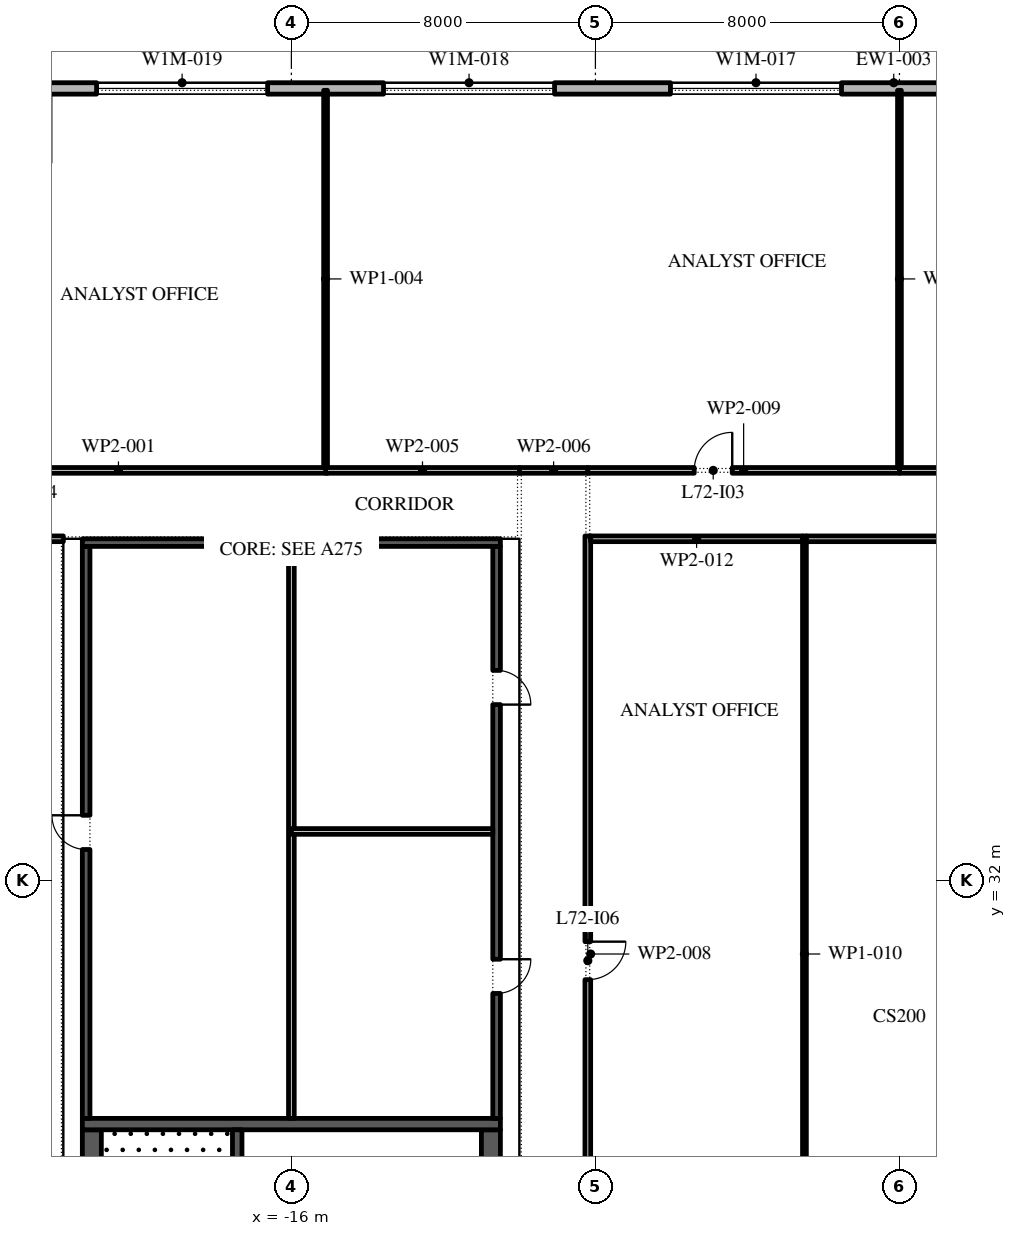
"""IFC4 building model, lengths in metres.
Left out: names, types, materials, properties, quantities, classifications, styles, units other than length and angle.
Written with IfcOpenShell. Run it as: python <this file> out.ifc"""

import sys

from ifc_helpers import new_model, si_unit, direction, frame, frame_2d, origin, place, context, subcontext, project, spatial, rectangle, extrude, element, fill, save


model = new_model("IFC4")
c1 = context("Model", 3, precision=1e-05, world=origin(), true_north=direction((0.0, 1.0)))
c2 = subcontext(c1, "Body", "Model", "MODEL_VIEW")
j1 = project(units=[si_unit("LENGTHUNIT", "METRE"), si_unit("PLANEANGLEUNIT", "RADIAN")], contexts=[c1])
p1 = place(None, origin())
s1 = spatial("IfcSite", under=j1, at=p1, CompositionType="ELEMENT")
p2 = place(p1, origin())
s2 = spatial("IfcBuilding", under=s1, at=p2, CompositionType="ELEMENT")
p3 = place(p2, frame((0.0, 0.0, 330.0)))
s3 = spatial("IfcBuildingStorey", under=s2, at=p3, CompositionType="ELEMENT", Elevation=330.0)
p4 = place(p3, frame((22.35, 52.85, 0.0), z_axis=(0.0, 0.0, 1.0), x_axis=(-1.0, 0.0, 0.0)))
e1 = element("IfcWall", 1, at=p4, inside=s3, PredefinedType="STANDARD", context=c2, shape_type="SweptSolid", body=[
    extrude(rectangle(XDim=45.0, YDim=0.3, at=frame_2d((22.5, 0.0))), origin(), (0.0, 0.0, 1.0), 4.0),
])
p5 = place(p4, frame((1.375, 0.0, 0.45)))
e2 = element("IfcOpeningElement", 2, at=p5, cuts=e1, PredefinedType="OPENING", context=c2, shape_type="SweptSolid", body=[
    extrude(rectangle(XDim=4.5, YDim=2.575, at=frame_2d((2.25, 1.288))), frame((0.0, 0.16, 0.0), z_axis=(0.0, -1.0, 0.0), x_axis=(1.0, 0.0, 0.0)), (0.0, 0.0, 1.0), 0.32),
])
p6 = place(p4, frame((8.775, 0.0, 0.45)))
e3 = element("IfcOpeningElement", 3, at=p6, cuts=e1, PredefinedType="OPENING", context=c2, shape_type="SweptSolid", body=[
    extrude(rectangle(XDim=4.5, YDim=2.575, at=frame_2d((2.25, 1.288))), frame((0.0, 0.16, 0.0), z_axis=(0.0, -1.0, 0.0), x_axis=(1.0, 0.0, 0.0)), (0.0, 0.0, 1.0), 0.32),
])
p7 = place(p4, frame((17.375, 0.0, 0.0)))
e4 = element("IfcOpeningElement", 4, at=p7, cuts=e1, PredefinedType="OPENING", context=c2, shape_type="SweptSolid", body=[
    extrude(rectangle(XDim=2.4, YDim=3.025, at=frame_2d((1.2, 1.512))), frame((0.0, 0.16, 0.0), z_axis=(0.0, -1.0, 0.0), x_axis=(1.0, 0.0, 0.0)), (0.0, 0.0, 1.0), 0.32),
])
p8 = place(p4, frame((23.875, 0.0, 0.45)))
e5 = element("IfcOpeningElement", 5, at=p8, cuts=e1, PredefinedType="OPENING", context=c2, shape_type="SweptSolid", body=[
    extrude(rectangle(XDim=4.5, YDim=2.575, at=frame_2d((2.25, 1.288))), frame((0.0, 0.16, 0.0), z_axis=(0.0, -1.0, 0.0), x_axis=(1.0, 0.0, 0.0)), (0.0, 0.0, 1.0), 0.32),
])
p9 = place(p4, frame((31.425, 0.0, 0.45)))
e6 = element("IfcOpeningElement", 6, at=p9, cuts=e1, PredefinedType="OPENING", context=c2, shape_type="SweptSolid", body=[
    extrude(rectangle(XDim=4.5, YDim=2.575, at=frame_2d((2.25, 1.288))), frame((0.0, 0.16, 0.0), z_axis=(0.0, -1.0, 0.0), x_axis=(1.0, 0.0, 0.0)), (0.0, 0.0, 1.0), 0.32),
])
p10 = place(p4, frame((38.975, 0.0, 0.45)))
e7 = element("IfcOpeningElement", 7, at=p10, cuts=e1, PredefinedType="OPENING", context=c2, shape_type="SweptSolid", body=[
    extrude(rectangle(XDim=4.5, YDim=2.575, at=frame_2d((2.25, 1.288))), frame((0.0, 0.16, 0.0), z_axis=(0.0, -1.0, 0.0), x_axis=(1.0, 0.0, 0.0)), (0.0, 0.0, 1.0), 0.32),
])
p11 = place(p3, frame((-21.25, -2.45, 0.0), z_axis=(0.0, 0.0, 1.0), x_axis=(0.0, 1.0, 0.0)))
e8 = element("IfcWall", 8, at=p11, inside=s3, PredefinedType="SHEAR", context=c2, shape_type="SweptSolid", body=[
    extrude(rectangle(XDim=27.9, YDim=0.5, at=frame_2d((13.95, 0.0))), origin(), (0.0, 0.0, 1.0), 4.0),
])
p12 = place(p11, frame((5.05, 0.0, 0.0)))
e9 = element("IfcOpeningElement", 9, at=p12, cuts=e8, PredefinedType="OPENING", context=c2, shape_type="SweptSolid", body=[
    extrude(rectangle(XDim=1.2, YDim=2.1, at=frame_2d((0.6, 1.05))), frame((0.0, 0.26, 0.0), z_axis=(0.0, -1.0, 0.0), x_axis=(1.0, 0.0, 0.0)), (0.0, 0.0, 1.0), 0.52),
])
p13 = place(p11, frame((21.65, 0.0, 0.0)))
e10 = element("IfcOpeningElement", 10, at=p13, cuts=e8, PredefinedType="OPENING", context=c2, shape_type="SweptSolid", body=[
    extrude(rectangle(XDim=1.2, YDim=2.1, at=frame_2d((0.6, 1.05))), frame((0.0, 0.26, 0.0), z_axis=(0.0, -1.0, 0.0), x_axis=(1.0, 0.0, 0.0)), (0.0, 0.0, 1.0), 0.52),
])
p14 = place(p3, frame((-10.75, -2.45, 0.0), z_axis=(0.0, 0.0, 1.0), x_axis=(0.0, 1.0, 0.0)))
e11 = element("IfcWall", 11, at=p14, inside=s3, PredefinedType="SHEAR", context=c2, shape_type="SweptSolid", body=[
    extrude(rectangle(XDim=27.9, YDim=0.5, at=frame_2d((13.95, 0.0))), origin(), (0.0, 0.0, 1.0), 4.0),
])
p15 = place(p14, frame((23.65, 0.0, 0.0)))
e12 = element("IfcOpeningElement", 12, at=p15, cuts=e11, PredefinedType="OPENING", context=c2, shape_type="SweptSolid", body=[
    extrude(rectangle(XDim=2.4, YDim=2.1, at=frame_2d((1.2, 1.05))), frame((0.0, 0.26, 0.0), z_axis=(0.0, -1.0, 0.0), x_axis=(1.0, 0.0, 0.0)), (0.0, 0.0, 1.0), 0.52),
])
p16 = place(p14, frame((1.087, 0.0, 0.0)))
e13 = element("IfcOpeningElement", 13, at=p16, cuts=e11, PredefinedType="OPENING", context=c2, shape_type="SweptSolid", body=[
    extrude(rectangle(XDim=0.9, YDim=2.1, at=frame_2d((0.45, 1.05))), frame((0.0, 0.26, 0.0), z_axis=(0.0, -1.0, 0.0), x_axis=(1.0, 0.0, 0.0)), (0.0, 0.0, 1.0), 0.52),
])
p17 = place(p14, frame((4.262, 0.0, 0.0)))
e14 = element("IfcOpeningElement", 14, at=p17, cuts=e11, PredefinedType="OPENING", context=c2, shape_type="SweptSolid", body=[
    extrude(rectangle(XDim=1.0, YDim=2.1, at=frame_2d((0.5, 1.05))), frame((0.0, 0.26, 0.0), z_axis=(0.0, -1.0, 0.0), x_axis=(1.0, 0.0, 0.0)), (0.0, 0.0, 1.0), 0.52),
])
p18 = place(p3, frame((-21.5, 25.6, 0.0), z_axis=(0.0, 0.0, 1.0), x_axis=(1.0, 0.0, 0.0)))
e15 = element("IfcWall", 15, at=p18, inside=s3, PredefinedType="SHEAR", context=c2, shape_type="SweptSolid", body=[
    extrude(rectangle(XDim=11.0, YDim=0.3, at=frame_2d((5.5, 0.0))), origin(), (0.0, 0.0, 1.0), 4.0),
])
p19 = place(p3, frame((-17.425, 19.15, 0.0), z_axis=(0.0, 0.0, 1.0), x_axis=(0.0, 1.0, 0.0)))
e16 = element("IfcWall", 16, at=p19, inside=s3, PredefinedType="SHEAR", context=c2, shape_type="SweptSolid", body=[
    extrude(rectangle(XDim=6.3, YDim=0.25, at=frame_2d((3.15, 0.0))), origin(), (0.0, 0.0, 1.0), 4.0),
])
p20 = place(p19, frame((0.05, 0.0, 0.0)))
e17 = element("IfcOpeningElement", 17, at=p20, cuts=e16, PredefinedType="OPENING", context=c2, shape_type="SweptSolid", body=[
    extrude(rectangle(XDim=1.2, YDim=2.1, at=frame_2d((0.6, 1.05))), frame((0.0, 0.135, 0.0), z_axis=(0.0, -1.0, 0.0), x_axis=(1.0, 0.0, 0.0)), (0.0, 0.0, 1.0), 0.27),
])
p21 = place(p3, frame((-21.4, 25.75, 0.0), z_axis=(0.0, 0.0, 1.0), x_axis=(0.0, 1.0, 0.0)))
e18 = element("IfcWall", 18, at=p21, inside=s3, PredefinedType="SHEAR", context=c2, shape_type="SweptSolid", body=[
    extrude(rectangle(XDim=15.05, YDim=0.2, at=frame_2d((7.525, 0.0))), origin(), (0.0, 0.0, 1.0), 4.0),
])
p22 = place(p21, frame((7.075, 0.0, 0.0)))
e19 = element("IfcOpeningElement", 19, at=p22, cuts=e18, PredefinedType="OPENING", context=c2, shape_type="SweptSolid", body=[
    extrude(rectangle(XDim=0.9, YDim=2.1, at=frame_2d((0.45, 1.05))), frame((0.0, 0.11, 0.0), z_axis=(0.0, -1.0, 0.0), x_axis=(1.0, 0.0, 0.0)), (0.0, 0.0, 1.0), 0.22),
])
p23 = place(p3, frame((-10.6, 25.75, 0.0), z_axis=(0.0, 0.0, 1.0), x_axis=(0.0, 1.0, 0.0)))
e20 = element("IfcWall", 20, at=p23, inside=s3, PredefinedType="SHEAR", context=c2, shape_type="SweptSolid", body=[
    extrude(rectangle(XDim=15.05, YDim=0.2, at=frame_2d((7.525, 0.0))), origin(), (0.0, 0.0, 1.0), 4.0),
])
p24 = place(p23, frame((3.288, 0.0, 0.0)))
e21 = element("IfcOpeningElement", 21, at=p24, cuts=e20, PredefinedType="OPENING", context=c2, shape_type="SweptSolid", body=[
    extrude(rectangle(XDim=0.9, YDim=2.1, at=frame_2d((0.45, 1.05))), frame((0.0, 0.11, 0.0), z_axis=(0.0, -1.0, 0.0), x_axis=(1.0, 0.0, 0.0)), (0.0, 0.0, 1.0), 0.22),
])
p25 = place(p23, frame((10.887, 0.0, 0.0)))
e22 = element("IfcOpeningElement", 22, at=p25, cuts=e20, PredefinedType="OPENING", context=c2, shape_type="SweptSolid", body=[
    extrude(rectangle(XDim=0.9, YDim=2.1, at=frame_2d((0.45, 1.05))), frame((0.0, 0.11, 0.0), z_axis=(0.0, -1.0, 0.0), x_axis=(1.0, 0.0, 0.0)), (0.0, 0.0, 1.0), 0.22),
])
p26 = place(p3, frame((-21.5, 40.9, 0.0), z_axis=(0.0, 0.0, 1.0), x_axis=(1.0, 0.0, 0.0)))
e23 = element("IfcWall", 23, at=p26, inside=s3, PredefinedType="SHEAR", context=c2, shape_type="SweptSolid", body=[
    extrude(rectangle(XDim=11.0, YDim=0.2, at=frame_2d((5.5, 0.0))), origin(), (0.0, 0.0, 1.0), 4.0),
])
p27 = place(p3, frame((-16.0, 25.75, 0.0), z_axis=(0.0, 0.0, 1.0), x_axis=(0.0, 1.0, 0.0)))
e24 = element("IfcWall", 24, at=p27, inside=s3, PredefinedType="PARTITIONING", context=c2, shape_type="SweptSolid", body=[
    extrude(rectangle(XDim=15.05, YDim=0.15, at=frame_2d((7.525, 0.0))), origin(), (0.0, 0.0, 1.0), 4.0),
])
p28 = place(p3, frame((-16.0, 33.3, 0.0), z_axis=(0.0, 0.0, 1.0), x_axis=(1.0, 0.0, 0.0)))
e25 = element("IfcWall", 25, at=p28, inside=s3, PredefinedType="PARTITIONING", context=c2, shape_type="SweptSolid", body=[
    extrude(rectangle(XDim=5.3, YDim=0.15, at=frame_2d((2.65, 0.0))), origin(), (0.0, 0.0, 1.0), 4.0),
])
p29 = place(p3, frame((-26.05, 42.8, 0.0), z_axis=(0.0, 0.0, 1.0), x_axis=(1.0, 0.0, 0.0)))
e26 = element("IfcWall", 26, at=p29, inside=s3, PredefinedType="PARTITIONING", context=c2, shape_type="SweptSolid", body=[
    extrude(rectangle(XDim=11.0, YDim=0.15, at=frame_2d((5.5, 0.0))), origin(), (0.0, 0.0, 1.0), 4.0),
])
p30 = place(p29, frame((2.55, 0.0, 0.0)))
e27 = element("IfcOpeningElement", 27, at=p30, cuts=e26, PredefinedType="OPENING", context=c2, shape_type="SweptSolid", body=[
    extrude(rectangle(XDim=1.0, YDim=2.1, at=frame_2d((0.5, 1.05))), frame((0.0, 0.085, 0.0), z_axis=(0.0, -1.0, 0.0), x_axis=(1.0, 0.0, 0.0)), (0.0, 0.0, 1.0), 0.17),
])
p31 = place(p3, frame((-22.0, 41.0, 0.0), z_axis=(0.0, 0.0, 1.0), x_axis=(-1.0, 0.0, 0.0)))
e28 = element("IfcWall", 28, at=p31, inside=s3, PredefinedType="PARTITIONING", context=c2, shape_type="SweptSolid", body=[
    extrude(rectangle(XDim=4.05, YDim=0.15, at=frame_2d((2.025, 0.0))), origin(), (0.0, 0.0, 1.0), 4.0),
])
p32 = place(p31, frame((2.1, 0.0, 0.0)))
e29 = element("IfcOpeningElement", 29, at=p32, cuts=e28, PredefinedType="OPENING", context=c2, shape_type="SweptSolid", body=[
    extrude(rectangle(XDim=1.0, YDim=2.1, at=frame_2d((0.5, 1.05))), frame((0.0, 0.085, 0.0), z_axis=(0.0, -1.0, 0.0), x_axis=(1.0, 0.0, 0.0)), (0.0, 0.0, 1.0), 0.17),
])
p33 = place(p3, frame((-15.1, 42.875, 0.0), z_axis=(0.0, 0.0, 1.0), x_axis=(0.0, 1.0, 0.0)))
e30 = element("IfcWall", 30, at=p33, inside=s3, PredefinedType="PARTITIONING", context=c2, shape_type="SweptSolid", body=[
    extrude(rectangle(XDim=9.925, YDim=0.1, at=frame_2d((4.962, 0.0))), origin(), (0.0, 0.0, 1.0), 4.0),
])
p34 = place(p3, frame((-15.1, 42.8, 0.0), z_axis=(0.0, 0.0, 1.0), x_axis=(1.0, 0.0, 0.0)))
e31 = element("IfcWall", 31, at=p34, inside=s3, PredefinedType="PARTITIONING", context=c2, shape_type="SweptSolid", body=[
    extrude(rectangle(XDim=5.1, YDim=0.15, at=frame_2d((2.55, 0.0))), origin(), (0.0, 0.0, 1.0), 4.0),
])
p35 = place(p3, frame((-10.0, 42.8, 0.0), z_axis=(0.0, 0.0, 1.0), x_axis=(1.0, 0.0, 0.0)))
e32 = element("IfcWall", 32, at=p35, inside=s3, PredefinedType="PARTITIONING", context=c2, shape_type="SweptSolid", body=[
    extrude(rectangle(XDim=1.8, YDim=0.15, at=frame_2d((0.9, 0.0))), origin(), (0.0, 0.0, 1.0), 4.0),
])
p36 = place(p3, frame((-8.2, 41.075, 0.0), z_axis=(0.0, 0.0, 1.0), x_axis=(0.0, -1.0, 0.0)))
e33 = element("IfcWall", 33, at=p36, inside=s3, PredefinedType="PARTITIONING", context=c2, shape_type="SweptSolid", body=[
    extrude(rectangle(XDim=22.0, YDim=0.15, at=frame_2d((11.0, 0.0))), origin(), (0.0, 0.0, 1.0), 4.0),
])
p37 = place(p36, frame((10.675, 0.0, 0.0)))
e34 = element("IfcOpeningElement", 34, at=p37, cuts=e33, PredefinedType="OPENING", context=c2, shape_type="SweptSolid", body=[
    extrude(rectangle(XDim=1.0, YDim=2.1, at=frame_2d((0.5, 1.05))), frame((0.0, 0.085, 0.0), z_axis=(0.0, -1.0, 0.0), x_axis=(1.0, 0.0, 0.0)), (0.0, 0.0, 1.0), 0.17),
])
p38 = place(p3, frame((-8.2, 42.8, 0.0), z_axis=(0.0, 0.0, 1.0), x_axis=(1.0, 0.0, 0.0)))
e35 = element("IfcWall", 35, at=p38, inside=s3, PredefinedType="PARTITIONING", context=c2, shape_type="SweptSolid", body=[
    extrude(rectangle(XDim=8.2, YDim=0.15, at=frame_2d((4.1, 0.0))), origin(), (0.0, 0.0, 1.0), 4.0),
])
p39 = place(p38, frame((2.8, 0.0, 0.0)))
e36 = element("IfcOpeningElement", 36, at=p39, cuts=e35, PredefinedType="OPENING", context=c2, shape_type="SweptSolid", body=[
    extrude(rectangle(XDim=1.0, YDim=2.1, at=frame_2d((0.5, 1.05))), frame((0.0, 0.085, 0.0), z_axis=(0.0, -1.0, 0.0), x_axis=(1.0, 0.0, 0.0)), (0.0, 0.0, 1.0), 0.17),
])
p40 = place(p3, frame((-2.5, 19.075, 0.0), z_axis=(0.0, 0.0, 1.0), x_axis=(0.0, 1.0, 0.0)))
e37 = element("IfcWall", 37, at=p40, inside=s3, PredefinedType="PARTITIONING", context=c2, shape_type="SweptSolid", body=[
    extrude(rectangle(XDim=22.0, YDim=0.1, at=frame_2d((11.0, 0.0))), origin(), (0.0, 0.0, 1.0), 4.0),
])
p41 = place(p3, frame((-2.55, 41.0, 0.0), z_axis=(0.0, 0.0, 1.0), x_axis=(-1.0, 0.0, 0.0)))
e38 = element("IfcWall", 38, at=p41, inside=s3, PredefinedType="PARTITIONING", context=c2, shape_type="SweptSolid", body=[
    extrude(rectangle(XDim=5.575, YDim=0.15, at=frame_2d((2.788, 0.0))), origin(), (0.0, 0.0, 1.0), 4.0),
])
p42 = place(p3, frame((0.0, 42.875, 0.0), z_axis=(0.0, 0.0, 1.0), x_axis=(0.0, 1.0, 0.0)))
e39 = element("IfcWall", 39, at=p42, inside=s3, PredefinedType="PARTITIONING", context=c2, shape_type="SweptSolid", body=[
    extrude(rectangle(XDim=9.925, YDim=0.1, at=frame_2d((4.962, 0.0))), origin(), (0.0, 0.0, 1.0), 4.0),
])
p43 = place(p3, frame((0.0, 42.8, 0.0), z_axis=(0.0, 0.0, 1.0), x_axis=(1.0, 0.0, 0.0)))
e40 = element("IfcWall", 40, at=p43, inside=s3, PredefinedType="PARTITIONING", context=c2, shape_type="SweptSolid", body=[
    extrude(rectangle(XDim=15.15, YDim=0.15, at=frame_2d((7.575, 0.0))), origin(), (0.0, 0.0, 1.0), 4.0),
])
p44 = place(p43, frame((5.45, 0.0, 0.0)))
e41 = element("IfcOpeningElement", 41, at=p44, cuts=e40, PredefinedType="OPENING", context=c2, shape_type="SweptSolid", body=[
    extrude(rectangle(XDim=1.0, YDim=2.1, at=frame_2d((0.5, 1.05))), frame((0.0, 0.085, 0.0), z_axis=(0.0, -1.0, 0.0), x_axis=(1.0, 0.0, 0.0)), (0.0, 0.0, 1.0), 0.17),
])
p45 = place(p3, frame((8.125, 41.0, 0.0), z_axis=(0.0, 0.0, 1.0), x_axis=(-1.0, 0.0, 0.0)))
e42 = element("IfcWall", 42, at=p45, inside=s3, PredefinedType="PARTITIONING", context=c2, shape_type="SweptSolid", body=[
    extrude(rectangle(XDim=10.575, YDim=0.15, at=frame_2d((5.288, 0.0))), origin(), (0.0, 0.0, 1.0), 4.0),
])
p46 = place(p8, origin())
e43 = element("IfcWindow", 43, at=p46, inside=s3, PartitioningType="DOUBLE_PANEL_VERTICAL", PredefinedType="WINDOW", context=c2, shape_type="SweptSolid", body=[
    extrude(rectangle(XDim=4.5, YDim=2.575, at=frame_2d((2.25, 1.288))), frame((0.0, 0.03, 0.0), z_axis=(0.0, -1.0, 0.0), x_axis=(1.0, 0.0, 0.0)), (0.0, 0.0, 1.0), 0.06),
])
fill(e5, e43)
p47 = place(p9, origin())
e44 = element("IfcWindow", 44, at=p47, inside=s3, PartitioningType="DOUBLE_PANEL_VERTICAL", PredefinedType="WINDOW", context=c2, shape_type="SweptSolid", body=[
    extrude(rectangle(XDim=4.5, YDim=2.575, at=frame_2d((2.25, 1.288))), frame((0.0, 0.03, 0.0), z_axis=(0.0, -1.0, 0.0), x_axis=(1.0, 0.0, 0.0)), (0.0, 0.0, 1.0), 0.06),
])
fill(e6, e44)
p48 = place(p10, origin())
e45 = element("IfcWindow", 45, at=p48, inside=s3, PartitioningType="DOUBLE_PANEL_VERTICAL", PredefinedType="WINDOW", context=c2, shape_type="SweptSolid", body=[
    extrude(rectangle(XDim=4.5, YDim=2.575, at=frame_2d((2.25, 1.288))), frame((0.0, 0.03, 0.0), z_axis=(0.0, -1.0, 0.0), x_axis=(1.0, 0.0, 0.0)), (0.0, 0.0, 1.0), 0.06),
])
fill(e7, e45)
p49 = place(p22, origin())
e46 = element("IfcDoor", 46, at=p49, inside=s3, OperationType="SINGLE_SWING_LEFT", PredefinedType="DOOR", context=c2, shape_type="SweptSolid", body=[
    extrude(rectangle(XDim=0.9, YDim=2.1, at=frame_2d((0.45, 1.05))), frame((0.0, -0.05, 0.0), z_axis=(0.0, -1.0, 0.0), x_axis=(1.0, 0.0, 0.0)), (0.0, 0.0, 1.0), 0.05),
])
fill(e19, e46)
p50 = place(p24, frame((0.9, 0.15, 0.0), z_axis=(0.0, 0.0, 1.0), x_axis=(-1.0, 0.0, 0.0)))
e47 = element("IfcDoor", 47, at=p50, inside=s3, OperationType="SINGLE_SWING_RIGHT", PredefinedType="DOOR", context=c2, shape_type="SweptSolid", body=[
    extrude(rectangle(XDim=0.9, YDim=2.1, at=frame_2d((0.45, 1.05))), frame((0.0, 0.1, 0.0), z_axis=(0.0, -1.0, 0.0), x_axis=(1.0, 0.0, 0.0)), (0.0, 0.0, 1.0), 0.05),
])
fill(e21, e47)
p51 = place(p25, frame((0.9, 0.15, 0.0), z_axis=(0.0, 0.0, 1.0), x_axis=(-1.0, 0.0, 0.0)))
e48 = element("IfcDoor", 48, at=p51, inside=s3, OperationType="SINGLE_SWING_LEFT", PredefinedType="DOOR", context=c2, shape_type="SweptSolid", body=[
    extrude(rectangle(XDim=0.9, YDim=2.1, at=frame_2d((0.45, 1.05))), frame((0.0, 0.1, 0.0), z_axis=(0.0, -1.0, 0.0), x_axis=(1.0, 0.0, 0.0)), (0.0, 0.0, 1.0), 0.05),
])
fill(e22, e48)
p52 = place(p39, origin())
e49 = element("IfcDoor", 49, at=p52, inside=s3, OperationType="SINGLE_SWING_LEFT", PredefinedType="DOOR", context=c2, shape_type="SweptSolid", body=[
    extrude(rectangle(XDim=1.0, YDim=2.1, at=frame_2d((0.5, 1.05))), frame((0.0, 0.025, 0.0), z_axis=(0.0, -1.0, 0.0), x_axis=(1.0, 0.0, 0.0)), (0.0, 0.0, 1.0), 0.05),
])
fill(e36, e49)
p53 = place(p37, origin())
e50 = element("IfcDoor", 50, at=p53, inside=s3, OperationType="SINGLE_SWING_RIGHT", PredefinedType="DOOR", context=c2, shape_type="SweptSolid", body=[
    extrude(rectangle(XDim=1.0, YDim=2.1, at=frame_2d((0.5, 1.05))), frame((0.0, 0.025, 0.0), z_axis=(0.0, -1.0, 0.0), x_axis=(1.0, 0.0, 0.0)), (0.0, 0.0, 1.0), 0.05),
])
fill(e34, e50)
save(model, sys.argv[1])
